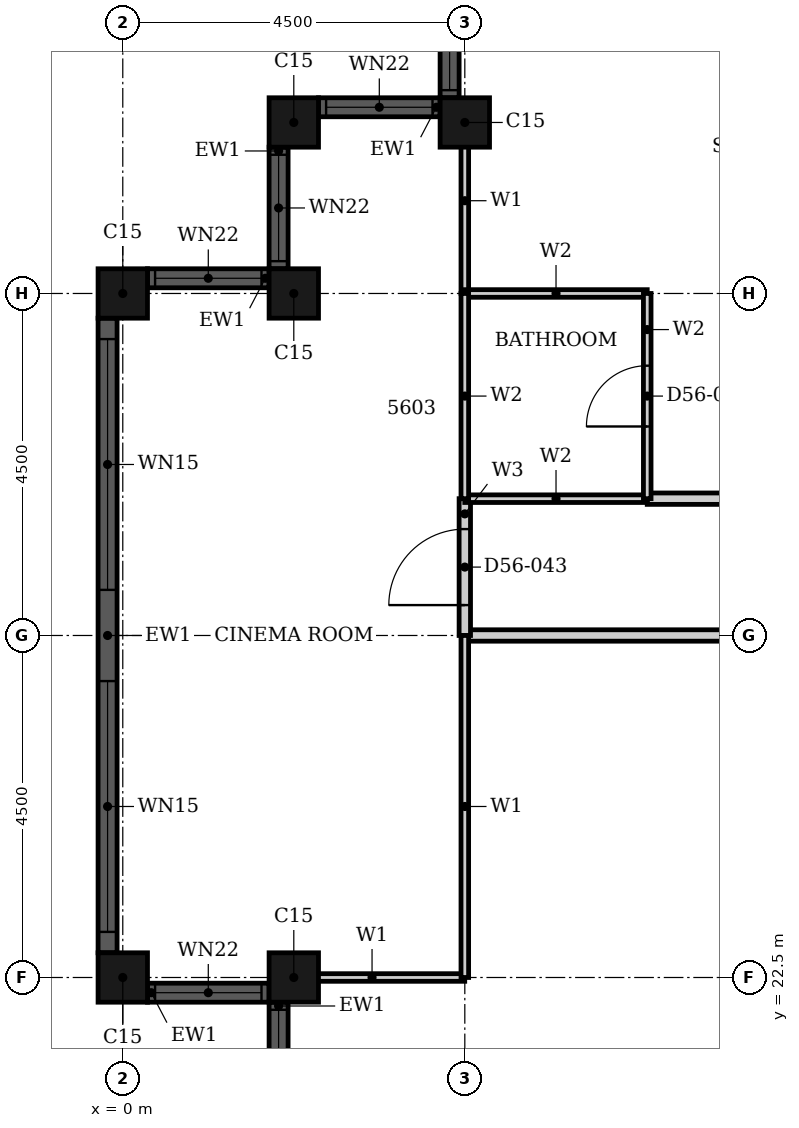
"""IFC4 building model, lengths in metres.
Left out: names, types, materials, properties, quantities, classifications, styles, units other than length and angle.
Written with IfcOpenShell. Run it as: python <this file> out.ifc"""

import sys

from ifc_helpers import new_model, si_unit, direction, frame, frame_2d, origin, origin_2d, place, context, subcontext, project, spatial, rectangle, hollow_rectangle, extrude, element, fill, save


model = new_model("IFC4")
c1 = context("Model", 3, precision=1e-05, world=origin(), true_north=direction((0.0, 1.0)))
c2 = subcontext(c1, "Body", "Model", "MODEL_VIEW")
j1 = project(units=[si_unit("LENGTHUNIT", "METRE"), si_unit("PLANEANGLEUNIT", "RADIAN")], contexts=[c1])
p1 = place(None, origin())
s1 = spatial("IfcSite", under=j1, at=p1, CompositionType="ELEMENT")
p2 = place(p1, origin())
s2 = spatial("IfcBuilding", under=s1, at=p2, CompositionType="ELEMENT")
p3 = place(p2, frame((0.0, 0.0, 222.0)))
s3 = spatial("IfcBuildingStorey", under=s2, at=p3, CompositionType="ELEMENT", Elevation=222.0)
for number, where, z_axis, x_axis in (
    (1, (4.5, 33.75, 0.0), (0.0, 0.0, 1.0), (1.0, 0.0, 0.0)),
    (2, (2.25, 33.75, 0.0), (0.0, 0.0, 1.0), (1.0, 0.0, 0.0)),
    (3, (2.25, 31.5, 0.0), (0.0, 0.0, 1.0), (1.0, 0.0, 0.0)),
    (4, (0.0, 31.5, 0.0), (0.0, 0.0, 1.0), (1.0, 0.0, 0.0)),
    (5, (0.0, 22.5, 0.0), (0.0, 0.0, 1.0), (1.0, 0.0, 0.0)),
    (6, (2.25, 22.5, 0.0), (0.0, 0.0, 1.0), (1.0, 0.0, 0.0)),
):
    element("IfcColumn", number, at=place(p3, frame(where, z_axis=z_axis, x_axis=x_axis)), inside=s3, PredefinedType="COLUMN", context=c2, shape_type="SweptSolid", body=[
        extrude(hollow_rectangle(XDim=0.65, YDim=0.65, WallThickness=0.021, at=origin_2d()), origin(), (0.0, 0.0, 1.0), 3.7),
    ])
p4 = place(p3, frame((4.3, 35.675, 0.0), z_axis=(0.0, 0.0, 1.0), x_axis=(0.0, -1.0, 0.0)))
e7 = element("IfcWall", 7, at=p4, inside=s3, PredefinedType="SOLIDWALL", context=c2, shape_type="SweptSolid", body=[
    extrude(rectangle(XDim=1.6, YDim=0.25, at=frame_2d((0.8, 0.0))), origin(), (0.0, 0.0, 1.0), 3.7),
])
p5 = place(p4, frame((0.1, 0.0, 0.9)))
e8 = element("IfcOpeningElement", 8, at=p5, cuts=e7, PredefinedType="OPENING", context=c2, shape_type="SweptSolid", body=[
    extrude(rectangle(XDim=1.4, YDim=1.85, at=frame_2d((0.7, 0.925))), frame((0.0, 0.135, 0.0), z_axis=(0.0, -1.0, 0.0), x_axis=(1.0, 0.0, 0.0)), (0.0, 0.0, 1.0), 0.27),
])
p6 = place(p3, frame((4.175, 33.95, 0.0), z_axis=(0.0, 0.0, 1.0), x_axis=(-1.0, 0.0, 0.0)))
e9 = element("IfcWall", 9, at=p6, inside=s3, PredefinedType="SOLIDWALL", context=c2, shape_type="SweptSolid", body=[
    extrude(rectangle(XDim=1.6, YDim=0.25, at=frame_2d((0.8, 0.0))), origin(), (0.0, 0.0, 1.0), 3.7),
])
p7 = place(p6, frame((0.1, 0.0, 0.9)))
e10 = element("IfcOpeningElement", 10, at=p7, cuts=e9, PredefinedType="OPENING", context=c2, shape_type="SweptSolid", body=[
    extrude(rectangle(XDim=1.4, YDim=1.85, at=frame_2d((0.7, 0.925))), frame((0.0, 0.135, 0.0), z_axis=(0.0, -1.0, 0.0), x_axis=(1.0, 0.0, 0.0)), (0.0, 0.0, 1.0), 0.27),
])
p8 = place(p3, frame((2.05, 33.425, 0.0), z_axis=(0.0, 0.0, 1.0), x_axis=(0.0, -1.0, 0.0)))
e11 = element("IfcWall", 11, at=p8, inside=s3, PredefinedType="SOLIDWALL", context=c2, shape_type="SweptSolid", body=[
    extrude(rectangle(XDim=1.6, YDim=0.25, at=frame_2d((0.8, 0.0))), origin(), (0.0, 0.0, 1.0), 3.7),
])
p9 = place(p8, frame((0.1, 0.0, 0.9)))
e12 = element("IfcOpeningElement", 12, at=p9, cuts=e11, PredefinedType="OPENING", context=c2, shape_type="SweptSolid", body=[
    extrude(rectangle(XDim=1.4, YDim=1.85, at=frame_2d((0.7, 0.925))), frame((0.0, 0.135, 0.0), z_axis=(0.0, -1.0, 0.0), x_axis=(1.0, 0.0, 0.0)), (0.0, 0.0, 1.0), 0.27),
])
p10 = place(p3, frame((1.925, 31.7, 0.0), z_axis=(0.0, 0.0, 1.0), x_axis=(-1.0, 0.0, 0.0)))
e13 = element("IfcWall", 13, at=p10, inside=s3, PredefinedType="SOLIDWALL", context=c2, shape_type="SweptSolid", body=[
    extrude(rectangle(XDim=1.6, YDim=0.25, at=frame_2d((0.8, 0.0))), origin(), (0.0, 0.0, 1.0), 3.7),
])
p11 = place(p10, frame((0.1, 0.0, 0.9)))
e14 = element("IfcOpeningElement", 14, at=p11, cuts=e13, PredefinedType="OPENING", context=c2, shape_type="SweptSolid", body=[
    extrude(rectangle(XDim=1.4, YDim=1.85, at=frame_2d((0.7, 0.925))), frame((0.0, 0.135, 0.0), z_axis=(0.0, -1.0, 0.0), x_axis=(1.0, 0.0, 0.0)), (0.0, 0.0, 1.0), 0.27),
])
p12 = place(p3, frame((-0.2, 31.175, 0.0), z_axis=(0.0, 0.0, 1.0), x_axis=(0.0, -1.0, 0.0)))
e15 = element("IfcWall", 15, at=p12, inside=s3, PredefinedType="SOLIDWALL", context=c2, shape_type="SweptSolid", body=[
    extrude(rectangle(XDim=8.35, YDim=0.25, at=frame_2d((4.175, 0.0))), origin(), (0.0, 0.0, 1.0), 3.7),
])
p13 = place(p12, frame((0.275, 0.0, 0.45)))
e16 = element("IfcOpeningElement", 16, at=p13, cuts=e15, PredefinedType="OPENING", context=c2, shape_type="SweptSolid", body=[
    extrude(rectangle(XDim=3.3, YDim=2.3, at=frame_2d((1.65, 1.15))), frame((0.0, 0.135, 0.0), z_axis=(0.0, -1.0, 0.0), x_axis=(1.0, 0.0, 0.0)), (0.0, 0.0, 1.0), 0.27),
])
p14 = place(p12, frame((4.775, 0.0, 0.45)))
e17 = element("IfcOpeningElement", 17, at=p14, cuts=e15, PredefinedType="OPENING", context=c2, shape_type="SweptSolid", body=[
    extrude(rectangle(XDim=3.3, YDim=2.3, at=frame_2d((1.65, 1.15))), frame((0.0, 0.135, 0.0), z_axis=(0.0, -1.0, 0.0), x_axis=(1.0, 0.0, 0.0)), (0.0, 0.0, 1.0), 0.27),
])
p15 = place(p3, frame((0.325, 22.3, 0.0), z_axis=(0.0, 0.0, 1.0), x_axis=(1.0, 0.0, 0.0)))
e18 = element("IfcWall", 18, at=p15, inside=s3, PredefinedType="SOLIDWALL", context=c2, shape_type="SweptSolid", body=[
    extrude(rectangle(XDim=1.6, YDim=0.25, at=frame_2d((0.8, 0.0))), origin(), (0.0, 0.0, 1.0), 3.7),
])
p16 = place(p15, frame((0.1, 0.0, 0.9)))
e19 = element("IfcOpeningElement", 19, at=p16, cuts=e18, PredefinedType="OPENING", context=c2, shape_type="SweptSolid", body=[
    extrude(rectangle(XDim=1.4, YDim=1.85, at=frame_2d((0.7, 0.925))), frame((0.0, 0.135, 0.0), z_axis=(0.0, -1.0, 0.0), x_axis=(1.0, 0.0, 0.0)), (0.0, 0.0, 1.0), 0.27),
])
p17 = place(p3, frame((2.05, 22.175, 0.0), z_axis=(0.0, 0.0, 1.0), x_axis=(0.0, -1.0, 0.0)))
e20 = element("IfcWall", 20, at=p17, inside=s3, PredefinedType="SOLIDWALL", context=c2, shape_type="SweptSolid", body=[
    extrude(rectangle(XDim=1.6, YDim=0.25, at=frame_2d((0.8, 0.0))), origin(), (0.0, 0.0, 1.0), 3.7),
])
p18 = place(p17, frame((0.1, 0.0, 0.9)))
e21 = element("IfcOpeningElement", 21, at=p18, cuts=e20, PredefinedType="OPENING", context=c2, shape_type="SweptSolid", body=[
    extrude(rectangle(XDim=1.4, YDim=1.85, at=frame_2d((0.7, 0.925))), frame((0.0, 0.135, 0.0), z_axis=(0.0, -1.0, 0.0), x_axis=(1.0, 0.0, 0.0)), (0.0, 0.0, 1.0), 0.27),
])
p19 = place(p3, frame((4.5, 27.0, 0.0), z_axis=(0.0, 0.0, 1.0), x_axis=(1.0, 0.0, 0.0)))
e22 = element("IfcWall", 22, at=p19, inside=s3, PredefinedType="PARTITIONING", context=c2, shape_type="SweptSolid", body=[
    extrude(rectangle(XDim=13.5, YDim=0.15, at=frame_2d((6.75, 0.0))), origin(), (0.0, 0.0, 1.0), 2.68),
])
p20 = place(p19, frame((5.35, 0.0, 0.0)))
e23 = element("IfcOpeningElement", 23, at=p20, cuts=e22, PredefinedType="OPENING", context=c2, shape_type="SweptSolid", body=[
    extrude(rectangle(XDim=1.0, YDim=2.1, at=frame_2d((0.5, 1.05))), frame((0.0, 0.085, 0.0), z_axis=(0.0, -1.0, 0.0), x_axis=(1.0, 0.0, 0.0)), (0.0, 0.0, 1.0), 0.17),
])
p21 = place(p3, frame((6.9, 28.8, 0.0), z_axis=(0.0, 0.0, 1.0), x_axis=(1.0, 0.0, 0.0)))
e24 = element("IfcWall", 24, at=p21, inside=s3, PredefinedType="PARTITIONING", context=c2, shape_type="SweptSolid", body=[
    extrude(rectangle(XDim=9.299, YDim=0.15, at=frame_2d((4.649, 0.0))), origin(), (0.0, 0.0, 1.0), 3.4),
])
p22 = place(p3, frame((4.5, 27.0, 0.0), z_axis=(0.0, 0.0, 1.0), x_axis=(0.0, 1.0, 0.0)))
e25 = element("IfcWall", 25, at=p22, inside=s3, PredefinedType="PARTITIONING", context=c2, shape_type="SweptSolid", body=[
    extrude(rectangle(XDim=1.8, YDim=0.15, at=frame_2d((0.9, 0.0))), origin(), (0.0, 0.0, 1.0), 3.4),
])
p23 = place(p22, frame((0.4, 0.0, 0.0)))
e26 = element("IfcOpeningElement", 26, at=p23, cuts=e25, PredefinedType="OPENING", context=c2, shape_type="SweptSolid", body=[
    extrude(rectangle(XDim=1.0, YDim=2.1, at=frame_2d((0.5, 1.05))), frame((0.0, 0.085, 0.0), z_axis=(0.0, -1.0, 0.0), x_axis=(1.0, 0.0, 0.0)), (0.0, 0.0, 1.0), 0.17),
])
p24 = place(p3, frame((2.06, 22.5, 0.0), z_axis=(0.0, 0.0, 1.0), x_axis=(1.0, 0.0, 0.0)))
e27 = element("IfcWall", 27, at=p24, inside=s3, PredefinedType="PARTITIONING", context=c2, shape_type="SweptSolid", body=[
    extrude(rectangle(XDim=2.439, YDim=0.1, at=frame_2d((1.219, 0.0))), origin(), (0.0, 0.0, 1.0), 2.68),
])
p25 = place(p3, frame((4.5, 31.501, 0.0), z_axis=(0.0, 0.0, 1.0), x_axis=(0.0, 1.0, 0.0)))
e28 = element("IfcWall", 28, at=p25, inside=s3, PredefinedType="PARTITIONING", context=c2, shape_type="SweptSolid", body=[
    extrude(rectangle(XDim=2.439, YDim=0.1, at=frame_2d((1.219, 0.0))), origin(), (0.0, 0.0, 1.0), 3.4),
])
p26 = place(p3, frame((4.5, 22.5, 0.0), z_axis=(0.0, 0.0, 1.0), x_axis=(0.0, 1.0, 0.0)))
e29 = element("IfcWall", 29, at=p26, inside=s3, PredefinedType="PARTITIONING", context=c2, shape_type="SweptSolid", body=[
    extrude(rectangle(XDim=4.5, YDim=0.1, at=frame_2d((2.25, 0.0))), origin(), (0.0, 0.0, 1.0), 3.4),
])
p27 = place(p3, frame((4.5, 28.8, 0.0), z_axis=(0.0, 0.0, 1.0), x_axis=(1.0, 0.0, 0.0)))
e30 = element("IfcWall", 30, at=p27, inside=s3, PredefinedType="PARTITIONING", context=c2, shape_type="SweptSolid", body=[
    extrude(rectangle(XDim=2.4, YDim=0.1, at=frame_2d((1.2, 0.0))), origin(), (0.0, 0.0, 1.0), 3.4),
])
p28 = place(p3, frame((4.5, 31.5, 0.0), z_axis=(0.0, 0.0, 1.0), x_axis=(1.0, 0.0, 0.0)))
e31 = element("IfcWall", 31, at=p28, inside=s3, PredefinedType="PARTITIONING", context=c2, shape_type="SweptSolid", body=[
    extrude(rectangle(XDim=2.4, YDim=0.1, at=frame_2d((1.2, 0.0))), origin(), (0.0, 0.0, 1.0), 2.68),
])
p29 = place(p3, frame((4.5, 28.8, 0.0), z_axis=(0.0, 0.0, 1.0), x_axis=(0.0, 1.0, 0.0)))
e32 = element("IfcWall", 32, at=p29, inside=s3, PredefinedType="PARTITIONING", context=c2, shape_type="SweptSolid", body=[
    extrude(rectangle(XDim=2.7, YDim=0.1, at=frame_2d((1.35, 0.0))), origin(), (0.0, 0.0, 1.0), 3.4),
])
p30 = place(p3, frame((6.9, 28.8, 0.0), z_axis=(0.0, 0.0, 1.0), x_axis=(0.0, 1.0, 0.0)))
e33 = element("IfcWall", 33, at=p30, inside=s3, PredefinedType="PARTITIONING", context=c2, shape_type="SweptSolid", body=[
    extrude(rectangle(XDim=2.7, YDim=0.1, at=frame_2d((1.35, 0.0))), origin(), (0.0, 0.0, 1.0), 3.4),
])
p31 = place(p30, frame((0.95, 0.0, 0.0)))
e34 = element("IfcOpeningElement", 34, at=p31, cuts=e33, PredefinedType="OPENING", context=c2, shape_type="SweptSolid", body=[
    extrude(rectangle(XDim=0.8, YDim=2.1, at=frame_2d((0.4, 1.05))), frame((0.0, 0.06, 0.0), z_axis=(0.0, -1.0, 0.0), x_axis=(1.0, 0.0, 0.0)), (0.0, 0.0, 1.0), 0.12),
])
p32 = place(p5, origin())
e35 = element("IfcWindow", 35, at=p32, inside=s3, PartitioningType="SINGLE_PANEL", PredefinedType="WINDOW", context=c2, shape_type="SweptSolid", body=[
    extrude(rectangle(XDim=1.4, YDim=1.85, at=frame_2d((0.7, 0.925))), frame((0.0, 0.03, 0.0), z_axis=(0.0, -1.0, 0.0), x_axis=(1.0, 0.0, 0.0)), (0.0, 0.0, 1.0), 0.06),
])
fill(e8, e35)
p33 = place(p7, origin())
e36 = element("IfcWindow", 36, at=p33, inside=s3, PartitioningType="SINGLE_PANEL", PredefinedType="WINDOW", context=c2, shape_type="SweptSolid", body=[
    extrude(rectangle(XDim=1.4, YDim=1.85, at=frame_2d((0.7, 0.925))), frame((0.0, 0.03, 0.0), z_axis=(0.0, -1.0, 0.0), x_axis=(1.0, 0.0, 0.0)), (0.0, 0.0, 1.0), 0.06),
])
fill(e10, e36)
p34 = place(p9, origin())
e37 = element("IfcWindow", 37, at=p34, inside=s3, PartitioningType="SINGLE_PANEL", PredefinedType="WINDOW", context=c2, shape_type="SweptSolid", body=[
    extrude(rectangle(XDim=1.4, YDim=1.85, at=frame_2d((0.7, 0.925))), frame((0.0, 0.03, 0.0), z_axis=(0.0, -1.0, 0.0), x_axis=(1.0, 0.0, 0.0)), (0.0, 0.0, 1.0), 0.06),
])
fill(e12, e37)
p35 = place(p11, origin())
e38 = element("IfcWindow", 38, at=p35, inside=s3, PartitioningType="SINGLE_PANEL", PredefinedType="WINDOW", context=c2, shape_type="SweptSolid", body=[
    extrude(rectangle(XDim=1.4, YDim=1.85, at=frame_2d((0.7, 0.925))), frame((0.0, 0.03, 0.0), z_axis=(0.0, -1.0, 0.0), x_axis=(1.0, 0.0, 0.0)), (0.0, 0.0, 1.0), 0.06),
])
fill(e14, e38)
p36 = place(p13, origin())
e39 = element("IfcWindow", 39, at=p36, inside=s3, PartitioningType="SINGLE_PANEL", PredefinedType="WINDOW", context=c2, shape_type="SweptSolid", body=[
    extrude(rectangle(XDim=3.3, YDim=2.3, at=frame_2d((1.65, 1.15))), frame((0.0, 0.03, 0.0), z_axis=(0.0, -1.0, 0.0), x_axis=(1.0, 0.0, 0.0)), (0.0, 0.0, 1.0), 0.06),
])
fill(e16, e39)
p37 = place(p14, origin())
e40 = element("IfcWindow", 40, at=p37, inside=s3, PartitioningType="SINGLE_PANEL", PredefinedType="WINDOW", context=c2, shape_type="SweptSolid", body=[
    extrude(rectangle(XDim=3.3, YDim=2.3, at=frame_2d((1.65, 1.15))), frame((0.0, 0.03, 0.0), z_axis=(0.0, -1.0, 0.0), x_axis=(1.0, 0.0, 0.0)), (0.0, 0.0, 1.0), 0.06),
])
fill(e17, e40)
p38 = place(p16, origin())
e41 = element("IfcWindow", 41, at=p38, inside=s3, PartitioningType="SINGLE_PANEL", PredefinedType="WINDOW", context=c2, shape_type="SweptSolid", body=[
    extrude(rectangle(XDim=1.4, YDim=1.85, at=frame_2d((0.7, 0.925))), frame((0.0, 0.03, 0.0), z_axis=(0.0, -1.0, 0.0), x_axis=(1.0, 0.0, 0.0)), (0.0, 0.0, 1.0), 0.06),
])
fill(e19, e41)
p39 = place(p18, origin())
e42 = element("IfcWindow", 42, at=p39, inside=s3, PartitioningType="SINGLE_PANEL", PredefinedType="WINDOW", context=c2, shape_type="SweptSolid", body=[
    extrude(rectangle(XDim=1.4, YDim=1.85, at=frame_2d((0.7, 0.925))), frame((0.0, 0.03, 0.0), z_axis=(0.0, -1.0, 0.0), x_axis=(1.0, 0.0, 0.0)), (0.0, 0.0, 1.0), 0.06),
])
fill(e21, e42)
p40 = place(p31, origin())
e43 = element("IfcDoor", 43, at=p40, inside=s3, OperationType="SINGLE_SWING_RIGHT", PredefinedType="DOOR", context=c2, shape_type="SweptSolid", body=[
    extrude(rectangle(XDim=0.8, YDim=2.1, at=frame_2d((0.4, 1.05))), frame((0.0, 0.025, 0.0), z_axis=(0.0, -1.0, 0.0), x_axis=(1.0, 0.0, 0.0)), (0.0, 0.0, 1.0), 0.05),
])
fill(e34, e43)
p41 = place(p23, origin())
e44 = element("IfcDoor", 44, at=p41, inside=s3, OperationType="SINGLE_SWING_LEFT", PredefinedType="DOOR", context=c2, shape_type="SweptSolid", body=[
    extrude(rectangle(XDim=1.0, YDim=2.1, at=frame_2d((0.5, 1.05))), frame((0.0, 0.025, 0.0), z_axis=(0.0, -1.0, 0.0), x_axis=(1.0, 0.0, 0.0)), (0.0, 0.0, 1.0), 0.05),
])
fill(e26, e44)
save(model, sys.argv[1])
